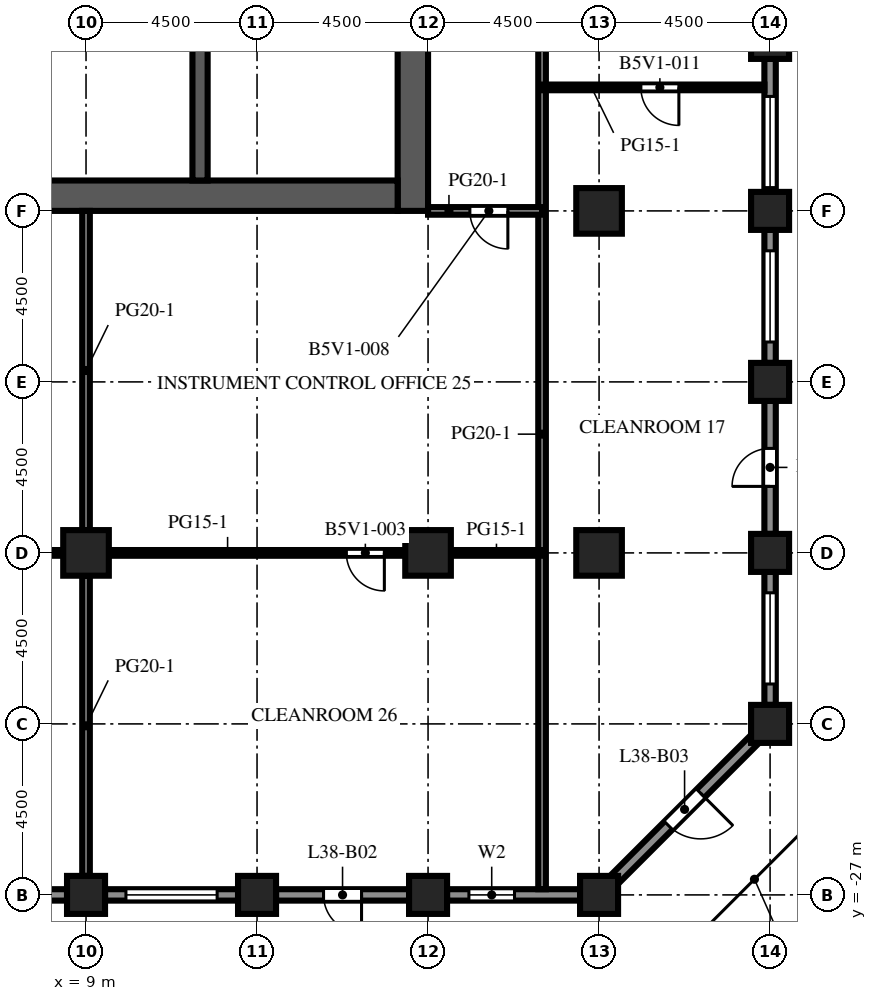
"""IFC4 building model, lengths in metres.
Left out: names, types, materials, properties, quantities, classifications, styles, units other than length and angle.
Written with IfcOpenShell. Run it as: python <this file> out.ifc"""

import sys

from ifc_helpers import new_model, si_unit, direction, frame, frame_2d, origin, origin_2d, place, context, subcontext, project, spatial, rectangle, extrude, element, fill, save


model = new_model("IFC4")
c1 = context("Model", 3, precision=1e-05, world=origin(), true_north=direction((0.0, 1.0)))
c2 = subcontext(c1, "Body", "Model", "MODEL_VIEW")
j1 = project(units=[si_unit("LENGTHUNIT", "METRE"), si_unit("PLANEANGLEUNIT", "RADIAN")], contexts=[c1])
p1 = place(None, origin())
s1 = spatial("IfcSite", under=j1, at=p1, CompositionType="ELEMENT")
p2 = place(p1, origin())
s2 = spatial("IfcBuilding", under=s1, at=p2, CompositionType="ELEMENT")
p3 = place(p2, frame((0.0, 0.0, 169.1)))
s3 = spatial("IfcBuildingStorey", under=s2, at=p3, CompositionType="ELEMENT", Elevation=169.1)
for number, where, z_axis, x_axis in (
    (1, (9.0, -27.0, 0.0), (0.0, 0.0, 1.0), (1.0, 0.0, 0.0)),
    (2, (13.5, -27.0, 0.0), (0.0, 0.0, 1.0), (1.0, 0.0, 0.0)),
    (3, (18.0, -27.0, 0.0), (0.0, 0.0, 1.0), (1.0, 0.0, 0.0)),
    (4, (22.5, -27.0, 0.0), (0.0, 0.0, 1.0), (1.0, 0.0, 0.0)),
    (5, (27.0, -22.5, 0.0), (0.0, 0.0, 1.0), (1.0, 0.0, 0.0)),
    (6, (27.0, -18.0, 0.0), (0.0, 0.0, 1.0), (1.0, 0.0, 0.0)),
    (7, (27.0, -13.5, 0.0), (0.0, 0.0, 1.0), (1.0, 0.0, 0.0)),
    (8, (27.0, -9.0, 0.0), (0.0, 0.0, 1.0), (1.0, 0.0, 0.0)),
    (9, (27.0, -4.5, 0.0), (0.0, 0.0, 1.0), (1.0, 0.0, 0.0)),
):
    element("IfcColumn", number, at=place(p3, frame(where, z_axis=z_axis, x_axis=x_axis)), inside=s3, PredefinedType="COLUMN", context=c2, shape_type="SweptSolid", body=[
        extrude(rectangle(XDim=1.0, YDim=1.0, at=origin_2d()), origin(), (0.0, 0.0, 1.0), 4.1),
    ])
for number, where, z_axis, x_axis in (
    (10, (9.0, -18.0, 0.0), (0.0, 0.0, 1.0), (1.0, 0.0, 0.0)),
    (11, (18.0, -18.0, 0.0), (0.0, 0.0, 1.0), (1.0, 0.0, 0.0)),
    (12, (22.5, -18.0, 0.0), (0.0, 0.0, 1.0), (1.0, 0.0, 0.0)),
    (13, (22.5, -9.0, 0.0), (0.0, 0.0, 1.0), (1.0, 0.0, 0.0)),
):
    element("IfcColumn", number, at=place(p3, frame(where, z_axis=z_axis, x_axis=x_axis)), inside=s3, PredefinedType="COLUMN", context=c2, shape_type="SweptSolid", body=[
        extrude(rectangle(XDim=1.2, YDim=1.2, at=origin_2d()), origin(), (0.0, 0.0, 1.0), 4.1),
    ])
p4 = place(p3, frame((17.6, -9.0, 0.0), z_axis=(0.0, 0.0, 1.0), x_axis=(0.0, 1.0, 0.0)))
e14 = element("IfcWall", 14, at=p4, inside=s3, PredefinedType="SHEAR", context=c2, shape_type="SweptSolid", body=[
    extrude(rectangle(XDim=27.5, YDim=0.8, at=frame_2d((13.75, 0.0))), origin(), (0.0, 0.0, 1.0), 4.1),
])
p5 = place(p4, frame((12.55, 0.0, 0.0)))
e15 = element("IfcOpeningElement", 15, at=p5, cuts=e14, PredefinedType="OPENING", context=c2, shape_type="SweptSolid", body=[
    extrude(rectangle(XDim=2.4, YDim=2.4, at=frame_2d((1.2, 1.2))), frame((0.0, 0.41, 0.0), z_axis=(0.0, -1.0, 0.0), x_axis=(1.0, 0.0, 0.0)), (0.0, 0.0, 1.0), 0.82),
])
p6 = place(p4, frame((6.825, 0.0, 0.0)))
e16 = element("IfcOpeningElement", 16, at=p6, cuts=e14, PredefinedType="OPENING", context=c2, shape_type="SweptSolid", body=[
    extrude(rectangle(XDim=1.2, YDim=2.1, at=frame_2d((0.6, 1.05))), frame((0.0, 0.41, 0.0), z_axis=(0.0, -1.0, 0.0), x_axis=(1.0, 0.0, 0.0)), (0.0, 0.0, 1.0), 0.82),
])
p7 = place(p4, frame((19.475, 0.0, 0.0)))
e17 = element("IfcOpeningElement", 17, at=p7, cuts=e14, PredefinedType="OPENING", context=c2, shape_type="SweptSolid", body=[
    extrude(rectangle(XDim=1.2, YDim=2.1, at=frame_2d((0.6, 1.05))), frame((0.0, 0.41, 0.0), z_axis=(0.0, -1.0, 0.0), x_axis=(1.0, 0.0, 0.0)), (0.0, 0.0, 1.0), 0.82),
])
p8 = place(p3, frame((6.8, -8.6, 0.0), z_axis=(0.0, 0.0, 1.0), x_axis=(1.0, 0.0, 0.0)))
e18 = element("IfcWall", 18, at=p8, inside=s3, PredefinedType="SHEAR", context=c2, shape_type="SweptSolid", body=[
    extrude(rectangle(XDim=10.4, YDim=0.8, at=frame_2d((5.2, 0.0))), origin(), (0.0, 0.0, 1.0), 4.1),
])
p9 = place(p3, frame((12.0, -8.2, 0.0), z_axis=(0.0, 0.0, 1.0), x_axis=(0.0, 1.0, 0.0)))
e19 = element("IfcWall", 19, at=p9, inside=s3, PredefinedType="SHEAR", context=c2, shape_type="SweptSolid", body=[
    extrude(rectangle(XDim=7.5, YDim=0.4, at=frame_2d((3.75, 0.0))), origin(), (0.0, 0.0, 1.0), 4.1),
])
p10 = place(p3, frame((8.5, -27.0, 0.0), z_axis=(0.0, 0.0, 1.0), x_axis=(-1.0, 0.0, 0.0)))
e20 = element("IfcWall", 20, at=p10, inside=s3, PredefinedType="SOLIDWALL", context=c2, shape_type="SweptSolid", body=[
    extrude(rectangle(XDim=3.5, YDim=0.3, at=frame_2d((1.75, 0.0))), origin(), (0.0, 0.0, 1.0), 2.85),
])
p11 = place(p10, frame((0.55, 0.0, 0.8)))
e21 = element("IfcOpeningElement", 21, at=p11, cuts=e20, PredefinedType="OPENING", context=c2, shape_type="SweptSolid", body=[
    extrude(rectangle(XDim=2.4, YDim=1.7, at=frame_2d((1.2, 0.85))), frame((0.0, 0.16, 0.0), z_axis=(0.0, -1.0, 0.0), x_axis=(1.0, 0.0, 0.0)), (0.0, 0.0, 1.0), 0.32),
])
p12 = place(p3, frame((13.0, -27.0, 0.0), z_axis=(0.0, 0.0, 1.0), x_axis=(-1.0, 0.0, 0.0)))
e22 = element("IfcWall", 22, at=p12, inside=s3, PredefinedType="SOLIDWALL", context=c2, shape_type="SweptSolid", body=[
    extrude(rectangle(XDim=3.5, YDim=0.3, at=frame_2d((1.75, 0.0))), origin(), (0.0, 0.0, 1.0), 2.85),
])
p13 = place(p12, frame((0.55, 0.0, 0.8)))
e23 = element("IfcOpeningElement", 23, at=p13, cuts=e22, PredefinedType="OPENING", context=c2, shape_type="SweptSolid", body=[
    extrude(rectangle(XDim=2.4, YDim=1.7, at=frame_2d((1.2, 0.85))), frame((0.0, 0.16, 0.0), z_axis=(0.0, -1.0, 0.0), x_axis=(1.0, 0.0, 0.0)), (0.0, 0.0, 1.0), 0.32),
])
p14 = place(p3, frame((17.5, -27.0, 0.0), z_axis=(0.0, 0.0, 1.0), x_axis=(-1.0, 0.0, 0.0)))
e24 = element("IfcWall", 24, at=p14, inside=s3, PredefinedType="SOLIDWALL", context=c2, shape_type="SweptSolid", body=[
    extrude(rectangle(XDim=3.5, YDim=0.3, at=frame_2d((1.75, 0.0))), origin(), (0.0, 0.0, 1.0), 2.85),
])
p15 = place(p14, frame((1.25, 0.0, 0.0)))
e25 = element("IfcOpeningElement", 25, at=p15, cuts=e24, PredefinedType="OPENING", context=c2, shape_type="SweptSolid", body=[
    extrude(rectangle(XDim=1.0, YDim=2.2, at=frame_2d((0.5, 1.1))), frame((0.0, 0.16, 0.0), z_axis=(0.0, -1.0, 0.0), x_axis=(1.0, 0.0, 0.0)), (0.0, 0.0, 1.0), 0.32),
])
p16 = place(p3, frame((22.0, -27.0, 0.0), z_axis=(0.0, 0.0, 1.0), x_axis=(-1.0, 0.0, 0.0)))
e26 = element("IfcWall", 26, at=p16, inside=s3, PredefinedType="SOLIDWALL", context=c2, shape_type="SweptSolid", body=[
    extrude(rectangle(XDim=3.5, YDim=0.3, at=frame_2d((1.75, 0.0))), origin(), (0.0, 0.0, 1.0), 2.85),
])
p17 = place(p16, frame((1.725, 0.0, 0.8)))
e27 = element("IfcOpeningElement", 27, at=p17, cuts=e26, PredefinedType="OPENING", context=c2, shape_type="SweptSolid", body=[
    extrude(rectangle(XDim=1.2, YDim=1.7, at=frame_2d((0.6, 0.85))), frame((0.0, 0.16, 0.0), z_axis=(0.0, -1.0, 0.0), x_axis=(1.0, 0.0, 0.0)), (0.0, 0.0, 1.0), 0.32),
])
p18 = place(p3, frame((26.606, -22.894, 0.0), z_axis=(0.0, 0.0, 1.0), x_axis=(-0.707106781187, -0.707106781187, 0.0)))
e28 = element("IfcWall", 28, at=p18, inside=s3, PredefinedType="SOLIDWALL", context=c2, shape_type="SweptSolid", body=[
    extrude(rectangle(XDim=5.25, YDim=0.3, at=frame_2d((2.625, 0.0))), origin(), (0.0, 0.0, 1.0), 2.85),
])
p19 = place(p18, frame((2.025, 0.0, 0.0)))
e29 = element("IfcOpeningElement", 29, at=p19, cuts=e28, PredefinedType="OPENING", context=c2, shape_type="SweptSolid", body=[
    extrude(rectangle(XDim=1.2, YDim=2.2, at=frame_2d((0.6, 1.1))), frame((0.0, 0.16, 0.0), z_axis=(0.0, -1.0, 0.0), x_axis=(1.0, 0.0, 0.0)), (0.0, 0.0, 1.0), 0.32),
])
p20 = place(p3, frame((27.0, -18.5, 0.0), z_axis=(0.0, 0.0, 1.0), x_axis=(0.0, -1.0, 0.0)))
e30 = element("IfcWall", 30, at=p20, inside=s3, PredefinedType="SOLIDWALL", context=c2, shape_type="SweptSolid", body=[
    extrude(rectangle(XDim=3.5, YDim=0.3, at=frame_2d((1.75, 0.0))), origin(), (0.0, 0.0, 1.0), 2.85),
])
p21 = place(p20, frame((0.55, 0.0, 0.8)))
e31 = element("IfcOpeningElement", 31, at=p21, cuts=e30, PredefinedType="OPENING", context=c2, shape_type="SweptSolid", body=[
    extrude(rectangle(XDim=2.4, YDim=1.7, at=frame_2d((1.2, 0.85))), frame((0.0, 0.16, 0.0), z_axis=(0.0, -1.0, 0.0), x_axis=(1.0, 0.0, 0.0)), (0.0, 0.0, 1.0), 0.32),
])
p22 = place(p3, frame((27.0, -14.0, 0.0), z_axis=(0.0, 0.0, 1.0), x_axis=(0.0, -1.0, 0.0)))
e32 = element("IfcWall", 32, at=p22, inside=s3, PredefinedType="SOLIDWALL", context=c2, shape_type="SweptSolid", body=[
    extrude(rectangle(XDim=3.5, YDim=0.3, at=frame_2d((1.75, 0.0))), origin(), (0.0, 0.0, 1.0), 2.85),
])
p23 = place(p22, frame((1.25, 0.0, 0.0)))
e33 = element("IfcOpeningElement", 33, at=p23, cuts=e32, PredefinedType="OPENING", context=c2, shape_type="SweptSolid", body=[
    extrude(rectangle(XDim=1.0, YDim=2.2, at=frame_2d((0.5, 1.1))), frame((0.0, 0.16, 0.0), z_axis=(0.0, -1.0, 0.0), x_axis=(1.0, 0.0, 0.0)), (0.0, 0.0, 1.0), 0.32),
])
p24 = place(p3, frame((27.0, -9.5, 0.0), z_axis=(0.0, 0.0, 1.0), x_axis=(0.0, -1.0, 0.0)))
e34 = element("IfcWall", 34, at=p24, inside=s3, PredefinedType="SOLIDWALL", context=c2, shape_type="SweptSolid", body=[
    extrude(rectangle(XDim=3.5, YDim=0.3, at=frame_2d((1.75, 0.0))), origin(), (0.0, 0.0, 1.0), 2.85),
])
p25 = place(p24, frame((0.55, 0.0, 0.8)))
e35 = element("IfcOpeningElement", 35, at=p25, cuts=e34, PredefinedType="OPENING", context=c2, shape_type="SweptSolid", body=[
    extrude(rectangle(XDim=2.4, YDim=1.7, at=frame_2d((1.2, 0.85))), frame((0.0, 0.16, 0.0), z_axis=(0.0, -1.0, 0.0), x_axis=(1.0, 0.0, 0.0)), (0.0, 0.0, 1.0), 0.32),
])
p26 = place(p3, frame((27.0, -5.0, 0.0), z_axis=(0.0, 0.0, 1.0), x_axis=(0.0, -1.0, 0.0)))
e36 = element("IfcWall", 36, at=p26, inside=s3, PredefinedType="SOLIDWALL", context=c2, shape_type="SweptSolid", body=[
    extrude(rectangle(XDim=3.5, YDim=0.3, at=frame_2d((1.75, 0.0))), origin(), (0.0, 0.0, 1.0), 2.85),
])
p27 = place(p26, frame((0.988, 0.0, 0.8)))
e37 = element("IfcOpeningElement", 37, at=p27, cuts=e36, PredefinedType="OPENING", context=c2, shape_type="SweptSolid", body=[
    extrude(rectangle(XDim=2.4, YDim=1.7, at=frame_2d((1.2, 0.85))), frame((0.0, 0.16, 0.0), z_axis=(0.0, -1.0, 0.0), x_axis=(1.0, 0.0, 0.0)), (0.0, 0.0, 1.0), 0.32),
])
p28 = place(p3, frame((8.3, -8.2, 0.0), z_axis=(0.0, 0.0, 1.0), x_axis=(0.0, 1.0, 0.0)))
e38 = element("IfcWall", 38, at=p28, inside=s3, PredefinedType="PARTITIONING", context=c2, shape_type="SweptSolid", body=[
    extrude(rectangle(XDim=2.55, YDim=0.1, at=frame_2d((1.275, 0.0))), origin(), (0.0, 0.0, 1.0), 3.65),
])
p29 = place(p28, frame((0.775, 0.0, 0.0)))
e39 = element("IfcOpeningElement", 39, at=p29, cuts=e38, PredefinedType="OPENING", context=c2, shape_type="SweptSolid", body=[
    extrude(rectangle(XDim=1.0, YDim=2.1, at=frame_2d((0.5, 1.05))), frame((0.0, 0.06, 0.0), z_axis=(0.0, -1.0, 0.0), x_axis=(1.0, 0.0, 0.0)), (0.0, 0.0, 1.0), 0.12),
])
p30 = place(p3, frame((8.3, -5.65, 0.0), z_axis=(0.0, 0.0, 1.0), x_axis=(0.0, 1.0, 0.0)))
e40 = element("IfcWall", 40, at=p30, inside=s3, PredefinedType="PARTITIONING", context=c2, shape_type="SweptSolid", body=[
    extrude(rectangle(XDim=2.1, YDim=0.1, at=frame_2d((1.05, 0.0))), origin(), (0.0, 0.0, 1.0), 3.65),
])
p31 = place(p30, frame((0.55, 0.0, 0.0)))
e41 = element("IfcOpeningElement", 41, at=p31, cuts=e40, PredefinedType="OPENING", context=c2, shape_type="SweptSolid", body=[
    extrude(rectangle(XDim=1.0, YDim=2.1, at=frame_2d((0.5, 1.05))), frame((0.0, 0.06, 0.0), z_axis=(0.0, -1.0, 0.0), x_axis=(1.0, 0.0, 0.0)), (0.0, 0.0, 1.0), 0.12),
])
p32 = place(p3, frame((8.3, -5.65, 0.0), z_axis=(0.0, 0.0, 1.0), x_axis=(1.0, 0.0, 0.0)))
e42 = element("IfcWall", 42, at=p32, inside=s3, PredefinedType="PARTITIONING", context=c2, shape_type="SweptSolid", body=[
    extrude(rectangle(XDim=3.5, YDim=0.1, at=frame_2d((1.75, 0.0))), origin(), (0.0, 0.0, 1.0), 3.65),
])
p33 = place(p3, frame((9.0, -26.5, 0.0), z_axis=(0.0, 0.0, 1.0), x_axis=(0.0, 1.0, 0.0)))
e43 = element("IfcWall", 43, at=p33, inside=s3, PredefinedType="PARTITIONING", context=c2, shape_type="SweptSolid", body=[
    extrude(rectangle(XDim=7.9, YDim=0.2, at=frame_2d((3.95, 0.0))), origin(), (0.0, 0.0, 1.0), 3.65),
])
p34 = place(p3, frame((9.0, -17.4, 0.0), z_axis=(0.0, 0.0, 1.0), x_axis=(0.0, 1.0, 0.0)))
e44 = element("IfcWall", 44, at=p34, inside=s3, PredefinedType="PARTITIONING", context=c2, shape_type="SweptSolid", body=[
    extrude(rectangle(XDim=8.4, YDim=0.2, at=frame_2d((4.2, 0.0))), origin(), (0.0, 0.0, 1.0), 3.65),
])
p35 = place(p3, frame((21.0, 3.25, 0.0), z_axis=(0.0, 0.0, 1.0), x_axis=(0.0, -1.0, 0.0)))
e45 = element("IfcWall", 45, at=p35, inside=s3, PredefinedType="PARTITIONING", context=c2, shape_type="SweptSolid", body=[
    extrude(rectangle(XDim=30.1, YDim=0.2, at=frame_2d((15.05, 0.0))), origin(), (0.0, 0.0, 1.0), 3.65),
])
p36 = place(p35, frame((5.15, 0.0, 0.0)))
e46 = element("IfcOpeningElement", 46, at=p36, cuts=e45, PredefinedType="OPENING", context=c2, shape_type="SweptSolid", body=[
    extrude(rectangle(XDim=1.0, YDim=2.1, at=frame_2d((0.5, 1.05))), frame((0.0, 0.11, 0.0), z_axis=(0.0, -1.0, 0.0), x_axis=(1.0, 0.0, 0.0)), (0.0, 0.0, 1.0), 0.22),
])
p37 = place(p3, frame((8.4, -18.0, 0.0), z_axis=(0.0, 0.0, 1.0), x_axis=(-1.0, 0.0, 0.0)))
e47 = element("IfcWall", 47, at=p37, inside=s3, PredefinedType="PARTITIONING", context=c2, shape_type="SweptSolid", body=[
    extrude(rectangle(XDim=7.8, YDim=0.15, at=frame_2d((3.9, 0.0))), origin(), (0.0, 0.0, 1.0), 3.65),
])
p38 = place(p37, frame((5.8, 0.0, 0.0)))
e48 = element("IfcOpeningElement", 48, at=p38, cuts=e47, PredefinedType="OPENING", context=c2, shape_type="SweptSolid", body=[
    extrude(rectangle(XDim=1.0, YDim=2.1, at=frame_2d((0.5, 1.05))), frame((0.0, 0.085, 0.0), z_axis=(0.0, -1.0, 0.0), x_axis=(1.0, 0.0, 0.0)), (0.0, 0.0, 1.0), 0.17),
])
p39 = place(p3, frame((17.4, -18.0, 0.0), z_axis=(0.0, 0.0, 1.0), x_axis=(-1.0, 0.0, 0.0)))
e49 = element("IfcWall", 49, at=p39, inside=s3, PredefinedType="PARTITIONING", context=c2, shape_type="SweptSolid", body=[
    extrude(rectangle(XDim=7.8, YDim=0.15, at=frame_2d((3.9, 0.0))), origin(), (0.0, 0.0, 1.0), 3.65),
])
p40 = place(p39, frame((0.55, 0.0, 0.0)))
e50 = element("IfcOpeningElement", 50, at=p40, cuts=e49, PredefinedType="OPENING", context=c2, shape_type="SweptSolid", body=[
    extrude(rectangle(XDim=1.0, YDim=2.1, at=frame_2d((0.5, 1.05))), frame((0.0, 0.085, 0.0), z_axis=(0.0, -1.0, 0.0), x_axis=(1.0, 0.0, 0.0)), (0.0, 0.0, 1.0), 0.17),
])
p41 = place(p3, frame((18.6, -18.0, 0.0), z_axis=(0.0, 0.0, 1.0), x_axis=(1.0, 0.0, 0.0)))
e51 = element("IfcWall", 51, at=p41, inside=s3, PredefinedType="PARTITIONING", context=c2, shape_type="SweptSolid", body=[
    extrude(rectangle(XDim=2.4, YDim=0.15, at=frame_2d((1.2, 0.0))), origin(), (0.0, 0.0, 1.0), 3.65),
])
p42 = place(p3, frame((21.0, -9.0, 0.0), z_axis=(0.0, 0.0, 1.0), x_axis=(-1.0, 0.0, 0.0)))
e52 = element("IfcWall", 52, at=p42, inside=s3, PredefinedType="PARTITIONING", context=c2, shape_type="SweptSolid", body=[
    extrude(rectangle(XDim=3.0, YDim=0.2, at=frame_2d((1.5, 0.0))), origin(), (0.0, 0.0, 1.0), 3.65),
])
p43 = place(p42, frame((0.9, 0.0, 0.0)))
e53 = element("IfcOpeningElement", 53, at=p43, cuts=e52, PredefinedType="OPENING", context=c2, shape_type="SweptSolid", body=[
    extrude(rectangle(XDim=1.0, YDim=2.1, at=frame_2d((0.5, 1.05))), frame((0.0, 0.11, 0.0), z_axis=(0.0, -1.0, 0.0), x_axis=(1.0, 0.0, 0.0)), (0.0, 0.0, 1.0), 0.22),
])
p44 = place(p3, frame((26.85, -5.75, 0.0), z_axis=(0.0, 0.0, 1.0), x_axis=(-1.0, 0.0, 0.0)))
e54 = element("IfcWall", 54, at=p44, inside=s3, PredefinedType="PARTITIONING", context=c2, shape_type="SweptSolid", body=[
    extrude(rectangle(XDim=5.85, YDim=0.15, at=frame_2d((2.925, 0.0))), origin(), (0.0, 0.0, 1.0), 3.65),
])
p45 = place(p44, frame((2.25, 0.0, 0.0)))
e55 = element("IfcOpeningElement", 55, at=p45, cuts=e54, PredefinedType="OPENING", context=c2, shape_type="SweptSolid", body=[
    extrude(rectangle(XDim=1.0, YDim=2.1, at=frame_2d((0.5, 1.05))), frame((0.0, 0.085, 0.0), z_axis=(0.0, -1.0, 0.0), x_axis=(1.0, 0.0, 0.0)), (0.0, 0.0, 1.0), 0.17),
])
p46 = place(p13, origin())
e56 = element("IfcWindow", 56, at=p46, inside=s3, PartitioningType="SINGLE_PANEL", PredefinedType="WINDOW", context=c2, shape_type="SweptSolid", body=[
    extrude(rectangle(XDim=2.4, YDim=1.7, at=frame_2d((1.2, 0.85))), frame((0.0, 0.03, 0.0), z_axis=(0.0, -1.0, 0.0), x_axis=(1.0, 0.0, 0.0)), (0.0, 0.0, 1.0), 0.06),
])
fill(e23, e56)
p47 = place(p15, origin())
e57 = element("IfcDoor", 57, at=p47, inside=s3, OperationType="SINGLE_SWING_LEFT", PredefinedType="DOOR", context=c2, shape_type="SweptSolid", body=[
    extrude(rectangle(XDim=1.0, YDim=2.2, at=frame_2d((0.5, 1.1))), frame((0.0, 0.025, 0.0), z_axis=(0.0, -1.0, 0.0), x_axis=(1.0, 0.0, 0.0)), (0.0, 0.0, 1.0), 0.05),
])
fill(e25, e57)
p48 = place(p17, origin())
e58 = element("IfcWindow", 58, at=p48, inside=s3, PartitioningType="SINGLE_PANEL", PredefinedType="WINDOW", context=c2, shape_type="SweptSolid", body=[
    extrude(rectangle(XDim=1.2, YDim=1.7, at=frame_2d((0.6, 0.85))), frame((0.0, 0.03, 0.0), z_axis=(0.0, -1.0, 0.0), x_axis=(1.0, 0.0, 0.0)), (0.0, 0.0, 1.0), 0.06),
])
fill(e27, e58)
p49 = place(p19, origin())
e59 = element("IfcDoor", 59, at=p49, inside=s3, OperationType="SINGLE_SWING_LEFT", PredefinedType="DOOR", context=c2, shape_type="SweptSolid", body=[
    extrude(rectangle(XDim=1.2, YDim=2.2, at=frame_2d((0.6, 1.1))), frame((0.0, 0.025, 0.0), z_axis=(0.0, -1.0, 0.0), x_axis=(1.0, 0.0, 0.0)), (0.0, 0.0, 1.0), 0.05),
])
fill(e29, e59)
p50 = place(p21, origin())
e60 = element("IfcWindow", 60, at=p50, inside=s3, PartitioningType="SINGLE_PANEL", PredefinedType="WINDOW", context=c2, shape_type="SweptSolid", body=[
    extrude(rectangle(XDim=2.4, YDim=1.7, at=frame_2d((1.2, 0.85))), frame((0.0, 0.03, 0.0), z_axis=(0.0, -1.0, 0.0), x_axis=(1.0, 0.0, 0.0)), (0.0, 0.0, 1.0), 0.06),
])
fill(e31, e60)
p51 = place(p23, origin())
e61 = element("IfcDoor", 61, at=p51, inside=s3, OperationType="SINGLE_SWING_RIGHT", PredefinedType="DOOR", context=c2, shape_type="SweptSolid", body=[
    extrude(rectangle(XDim=1.0, YDim=2.2, at=frame_2d((0.5, 1.1))), frame((0.0, 0.025, 0.0), z_axis=(0.0, -1.0, 0.0), x_axis=(1.0, 0.0, 0.0)), (0.0, 0.0, 1.0), 0.05),
])
fill(e33, e61)
p52 = place(p25, origin())
e62 = element("IfcWindow", 62, at=p52, inside=s3, PartitioningType="SINGLE_PANEL", PredefinedType="WINDOW", context=c2, shape_type="SweptSolid", body=[
    extrude(rectangle(XDim=2.4, YDim=1.7, at=frame_2d((1.2, 0.85))), frame((0.0, 0.03, 0.0), z_axis=(0.0, -1.0, 0.0), x_axis=(1.0, 0.0, 0.0)), (0.0, 0.0, 1.0), 0.06),
])
fill(e35, e62)
p53 = place(p27, origin())
e63 = element("IfcWindow", 63, at=p53, inside=s3, PartitioningType="SINGLE_PANEL", PredefinedType="WINDOW", context=c2, shape_type="SweptSolid", body=[
    extrude(rectangle(XDim=2.4, YDim=1.7, at=frame_2d((1.2, 0.85))), frame((0.0, 0.03, 0.0), z_axis=(0.0, -1.0, 0.0), x_axis=(1.0, 0.0, 0.0)), (0.0, 0.0, 1.0), 0.06),
])
fill(e37, e63)
p54 = place(p29, origin())
e64 = element("IfcDoor", 64, at=p54, inside=s3, OperationType="SINGLE_SWING_LEFT", PredefinedType="DOOR", context=c2, shape_type="SweptSolid", body=[
    extrude(rectangle(XDim=1.0, YDim=2.1, at=frame_2d((0.5, 1.05))), frame((0.0, 0.025, 0.0), z_axis=(0.0, -1.0, 0.0), x_axis=(1.0, 0.0, 0.0)), (0.0, 0.0, 1.0), 0.05),
])
fill(e39, e64)
p55 = place(p31, origin())
e65 = element("IfcDoor", 65, at=p55, inside=s3, OperationType="SINGLE_SWING_RIGHT", PredefinedType="DOOR", context=c2, shape_type="SweptSolid", body=[
    extrude(rectangle(XDim=1.0, YDim=2.1, at=frame_2d((0.5, 1.05))), frame((0.0, 0.025, 0.0), z_axis=(0.0, -1.0, 0.0), x_axis=(1.0, 0.0, 0.0)), (0.0, 0.0, 1.0), 0.05),
])
fill(e41, e65)
p56 = place(p40, origin())
e66 = element("IfcDoor", 66, at=p56, inside=s3, OperationType="SINGLE_SWING_LEFT", PredefinedType="DOOR", context=c2, shape_type="SweptSolid", body=[
    extrude(rectangle(XDim=1.0, YDim=2.1, at=frame_2d((0.5, 1.05))), frame((0.0, 0.025, 0.0), z_axis=(0.0, -1.0, 0.0), x_axis=(1.0, 0.0, 0.0)), (0.0, 0.0, 1.0), 0.05),
])
fill(e50, e66)
p57 = place(p43, origin())
e67 = element("IfcDoor", 67, at=p57, inside=s3, OperationType="SINGLE_SWING_LEFT", PredefinedType="DOOR", context=c2, shape_type="SweptSolid", body=[
    extrude(rectangle(XDim=1.0, YDim=2.1, at=frame_2d((0.5, 1.05))), frame((0.0, 0.025, 0.0), z_axis=(0.0, -1.0, 0.0), x_axis=(1.0, 0.0, 0.0)), (0.0, 0.0, 1.0), 0.05),
])
fill(e53, e67)
p58 = place(p45, origin())
e68 = element("IfcDoor", 68, at=p58, inside=s3, OperationType="SINGLE_SWING_LEFT", PredefinedType="DOOR", context=c2, shape_type="SweptSolid", body=[
    extrude(rectangle(XDim=1.0, YDim=2.1, at=frame_2d((0.5, 1.05))), frame((0.0, 0.025, 0.0), z_axis=(0.0, -1.0, 0.0), x_axis=(1.0, 0.0, 0.0)), (0.0, 0.0, 1.0), 0.05),
])
fill(e55, e68)
save(model, sys.argv[1])
